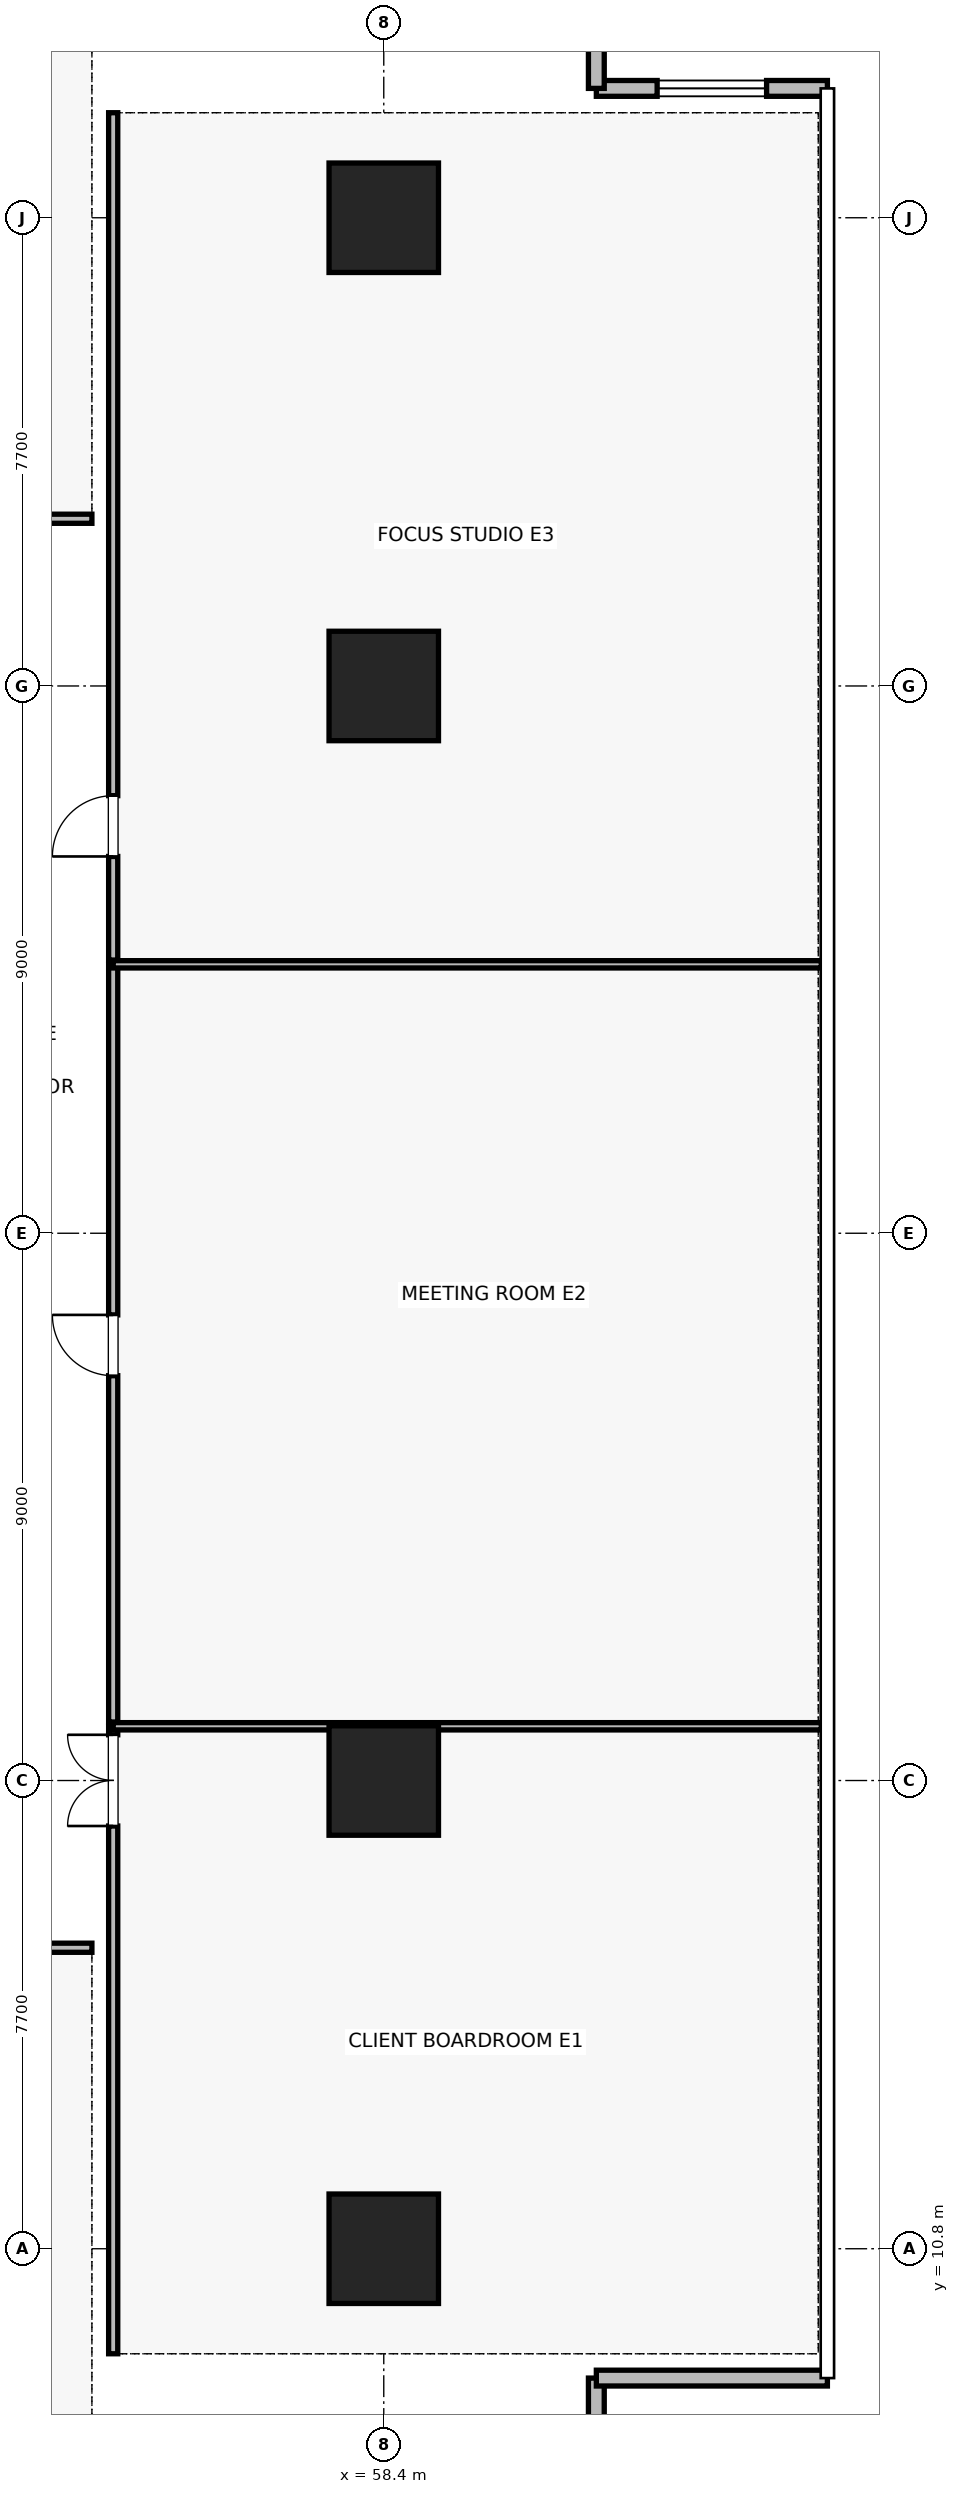
"""IFC4 building model, lengths in metres.
Left out: names, types, materials, properties, quantities, classifications, styles, units other than length and angle.
Written with IfcOpenShell. Run it as: python <this file> out.ifc"""

import sys

from ifc_helpers import new_model, si_unit, direction, frame, frame_2d, origin, origin_2d, place, context, subcontext, project, spatial, rectangle, extrude, element, fill, save


model = new_model("IFC4")
c1 = context("Model", 3, precision=1e-05, world=origin(), true_north=direction((0.0, 1.0)))
c2 = subcontext(c1, "Body", "Model", "MODEL_VIEW")
j1 = project(units=[si_unit("LENGTHUNIT", "METRE"), si_unit("PLANEANGLEUNIT", "RADIAN")], contexts=[c1])
p1 = place(None, origin())
s1 = spatial("IfcSite", under=j1, at=p1, CompositionType="ELEMENT")
p2 = place(p1, origin())
s2 = spatial("IfcBuilding", under=s1, at=p2, CompositionType="ELEMENT")
p3 = place(p2, frame((0.0, 0.0, 55.6)))
s3 = spatial("IfcBuildingStorey", under=s2, at=p3, CompositionType="ELEMENT", Elevation=55.6)
for number, where, z_axis, x_axis in (
    (1, (58.4, 18.5, 0.0), (0.0, 0.0, 1.0), (1.0, 0.0, 0.0)),
    (2, (58.4, 36.5, 0.0), (0.0, 0.0, 1.0), (1.0, 0.0, 0.0)),
    (3, (58.4, 10.8, 0.0), (0.0, 0.0, 1.0), (1.0, 0.0, 0.0)),
    (4, (58.4, 44.2, 0.0), (0.0, 0.0, 1.0), (1.0, 0.0, 0.0)),
):
    element("IfcColumn", number, at=place(p3, frame(where, z_axis=z_axis, x_axis=x_axis)), inside=s3, PredefinedType="COLUMN", context=c2, shape_type="SweptSolid", body=[
        extrude(rectangle(XDim=1.8, YDim=1.8, at=origin_2d()), origin(), (0.0, 0.0, 1.0), 4.0),
    ])
p4 = place(p3, frame((61.896, 5.273, 0.0), z_axis=(0.0, 0.0, 1.0), x_axis=(0.0, 1.0, 0.0)))
e5 = element("IfcWall", 5, at=p4, inside=s3, PredefinedType="PARAPET", context=c2, shape_type="SweptSolid", body=[
    extrude(rectangle(XDim=3.4, YDim=0.26, at=frame_2d((1.7, 0.0))), origin(), (0.0, 0.0, 1.0), 3.76),
])
p5 = place(p4, frame((0.8, 0.0, 0.85)))
e6 = element("IfcOpeningElement", 6, at=p5, cuts=e5, PredefinedType="OPENING", context=c2, shape_type="SweptSolid", body=[
    extrude(rectangle(XDim=1.8, YDim=2.2, at=frame_2d((0.9, 1.1))), frame((0.0, 0.13, 0.0), z_axis=(0.0, -1.0, 0.0), x_axis=(1.0, 0.0, 0.0)), (0.0, 0.0, 1.0), 0.26),
])
p6 = place(p3, frame((61.896, 8.673, 0.0), z_axis=(0.0, 0.0, 1.0), x_axis=(1.0, 0.0, 0.0)))
e7 = element("IfcWall", 7, at=p6, inside=s3, PredefinedType="PARAPET", context=c2, shape_type="SweptSolid", body=[
    extrude(rectangle(XDim=3.8, YDim=0.26, at=frame_2d((1.9, 0.0))), origin(), (0.0, 0.0, 1.0), 3.76),
])
p7 = place(p3, frame((65.696, 46.327, 0.0), z_axis=(0.0, 0.0, 1.0), x_axis=(-1.0, 0.0, 0.0)))
e8 = element("IfcWall", 8, at=p7, inside=s3, PredefinedType="PARAPET", context=c2, shape_type="SweptSolid", body=[
    extrude(rectangle(XDim=3.8, YDim=0.26, at=frame_2d((1.9, 0.0))), origin(), (0.0, 0.0, 1.0), 3.76),
])
p8 = place(p7, frame((1.0, 0.0, 0.85)))
e9 = element("IfcOpeningElement", 9, at=p8, cuts=e8, PredefinedType="OPENING", context=c2, shape_type="SweptSolid", body=[
    extrude(rectangle(XDim=1.8, YDim=2.2, at=frame_2d((0.9, 1.1))), frame((0.0, 0.13, 0.0), z_axis=(0.0, -1.0, 0.0), x_axis=(1.0, 0.0, 0.0)), (0.0, 0.0, 1.0), 0.26),
])
p9 = place(p3, frame((61.896, 46.327, 0.0), z_axis=(0.0, 0.0, 1.0), x_axis=(0.0, 1.0, 0.0)))
e10 = element("IfcWall", 10, at=p9, inside=s3, PredefinedType="PARAPET", context=c2, shape_type="SweptSolid", body=[
    extrude(rectangle(XDim=3.4, YDim=0.26, at=frame_2d((1.7, 0.0))), origin(), (0.0, 0.0, 1.0), 3.76),
])
p10 = place(p3, frame((46.87, 39.25, 0.0), z_axis=(0.0, 0.0, 1.0), x_axis=(1.0, 0.0, 0.0)))
e11 = element("IfcWall", 11, at=p10, inside=s3, PredefinedType="PARTITIONING", context=c2, shape_type="SweptSolid", body=[
    extrude(rectangle(XDim=6.73, YDim=0.15, at=frame_2d((3.365, 0.0))), origin(), (0.0, 0.0, 1.0), 2.85),
])
p11 = place(p10, frame((2.815, 0.0, 0.0)))
e12 = element("IfcOpeningElement", 12, at=p11, cuts=e11, PredefinedType="OPENING", context=c2, shape_type="SweptSolid", body=[
    extrude(rectangle(XDim=1.0, YDim=2.15, at=frame_2d((0.5, 1.075))), frame((0.0, 0.075, 0.0), z_axis=(0.0, -1.0, 0.0), x_axis=(1.0, 0.0, 0.0)), (0.0, 0.0, 1.0), 0.15),
])
p12 = place(p3, frame((37.894, 15.75, 0.0), z_axis=(0.0, 0.0, 1.0), x_axis=(1.0, 0.0, 0.0)))
e13 = element("IfcWall", 13, at=p12, inside=s3, PredefinedType="PARTITIONING", context=c2, shape_type="SweptSolid", body=[
    extrude(rectangle(XDim=15.706, YDim=0.15, at=frame_2d((7.853, 0.0))), origin(), (0.0, 0.0, 1.0), 2.85),
])
p13 = place(p12, frame((7.303, 0.0, 0.0)))
e14 = element("IfcOpeningElement", 14, at=p13, cuts=e13, PredefinedType="OPENING", context=c2, shape_type="SweptSolid", body=[
    extrude(rectangle(XDim=1.0, YDim=2.15, at=frame_2d((0.5, 1.075))), frame((0.0, 0.075, 0.0), z_axis=(0.0, -1.0, 0.0), x_axis=(1.0, 0.0, 0.0)), (0.0, 0.0, 1.0), 0.15),
])
p14 = place(p3, frame((53.95, 9.073, 0.0), z_axis=(0.0, 0.0, 1.0), x_axis=(0.0, 1.0, 0.0)))
e15 = element("IfcWall", 15, at=p14, inside=s3, PredefinedType="PARTITIONING", context=c2, shape_type="SweptSolid", body=[
    extrude(rectangle(XDim=10.319, YDim=0.15, at=frame_2d((5.16, 0.0))), origin(), (0.0, 0.0, 1.0), 2.85),
])
p15 = place(p14, frame((8.679, 0.0, 0.0)))
e16 = element("IfcOpeningElement", 16, at=p15, cuts=e15, PredefinedType="OPENING", context=c2, shape_type="SweptSolid", body=[
    extrude(rectangle(XDim=1.5, YDim=2.25, at=frame_2d((0.75, 1.125))), frame((0.0, 0.075, 0.0), z_axis=(0.0, -1.0, 0.0), x_axis=(1.0, 0.0, 0.0)), (0.0, 0.0, 1.0), 0.15),
])
p16 = place(p3, frame((53.95, 19.392, 0.0), z_axis=(0.0, 0.0, 1.0), x_axis=(1.0, 0.0, 0.0)))
e17 = element("IfcWall", 17, at=p16, inside=s3, PredefinedType="PARTITIONING", context=c2, shape_type="SweptSolid", body=[
    extrude(rectangle(XDim=11.646, YDim=0.12, at=frame_2d((5.823, 0.0))), origin(), (0.0, 0.0, 1.0), 2.85),
])
p17 = place(p3, frame((53.95, 19.462, 0.0), z_axis=(0.0, 0.0, 1.0), x_axis=(0.0, 1.0, 0.0)))
e18 = element("IfcWall", 18, at=p17, inside=s3, PredefinedType="PARTITIONING", context=c2, shape_type="SweptSolid", body=[
    extrude(rectangle(XDim=12.461, YDim=0.15, at=frame_2d((6.23, 0.0))), origin(), (0.0, 0.0, 1.0), 2.85),
])
p18 = place(p17, frame((5.695, 0.0, 0.0)))
e19 = element("IfcOpeningElement", 19, at=p18, cuts=e18, PredefinedType="OPENING", context=c2, shape_type="SweptSolid", body=[
    extrude(rectangle(XDim=1.0, YDim=2.15, at=frame_2d((0.5, 1.075))), frame((0.0, 0.075, 0.0), z_axis=(0.0, -1.0, 0.0), x_axis=(1.0, 0.0, 0.0)), (0.0, 0.0, 1.0), 0.15),
])
p19 = place(p3, frame((53.95, 31.923, 0.0), z_axis=(0.0, 0.0, 1.0), x_axis=(1.0, 0.0, 0.0)))
e20 = element("IfcWall", 20, at=p19, inside=s3, PredefinedType="PARTITIONING", context=c2, shape_type="SweptSolid", body=[
    extrude(rectangle(XDim=11.646, YDim=0.12, at=frame_2d((5.823, 0.0))), origin(), (0.0, 0.0, 1.0), 2.85),
])
p20 = place(p3, frame((53.95, 31.992, 0.0), z_axis=(0.0, 0.0, 1.0), x_axis=(0.0, 1.0, 0.0)))
e21 = element("IfcWall", 21, at=p20, inside=s3, PredefinedType="PARTITIONING", context=c2, shape_type="SweptSolid", body=[
    extrude(rectangle(XDim=13.935, YDim=0.15, at=frame_2d((6.967, 0.0))), origin(), (0.0, 0.0, 1.0), 2.85),
])
p21 = place(p20, frame((1.704, 0.0, 0.0)))
e22 = element("IfcOpeningElement", 22, at=p21, cuts=e21, PredefinedType="OPENING", context=c2, shape_type="SweptSolid", body=[
    extrude(rectangle(XDim=1.0, YDim=2.15, at=frame_2d((0.5, 1.075))), frame((0.0, 0.075, 0.0), z_axis=(0.0, -1.0, 0.0), x_axis=(1.0, 0.0, 0.0)), (0.0, 0.0, 1.0), 0.15),
])
p22 = place(p8, origin())
e23 = element("IfcWindow", 23, at=p22, inside=s3, PartitioningType="SINGLE_PANEL", PredefinedType="WINDOW", context=c2, shape_type="SweptSolid", body=[
    extrude(rectangle(XDim=1.8, YDim=2.2, at=frame_2d((0.9, 1.1))), frame((0.0, 0.03, 0.0), z_axis=(0.0, -1.0, 0.0), x_axis=(1.0, 0.0, 0.0)), (0.0, 0.0, 1.0), 0.06),
])
fill(e9, e23)
p23 = place(p15, origin())
e24 = element("IfcDoor", 24, at=p23, inside=s3, OperationType="DOUBLE_DOOR_SINGLE_SWING", PredefinedType="DOOR", context=c2, shape_type="SweptSolid", body=[
    extrude(rectangle(XDim=1.5, YDim=2.25, at=frame_2d((0.75, 1.125))), frame((0.0, 0.025, 0.0), z_axis=(0.0, -1.0, 0.0), x_axis=(1.0, 0.0, 0.0)), (0.0, 0.0, 1.0), 0.05),
])
fill(e16, e24)
p24 = place(p18, origin())
e25 = element("IfcDoor", 25, at=p24, inside=s3, OperationType="SINGLE_SWING_RIGHT", PredefinedType="DOOR", context=c2, shape_type="SweptSolid", body=[
    extrude(rectangle(XDim=1.0, YDim=2.15, at=frame_2d((0.5, 1.075))), frame((0.0, 0.025, 0.0), z_axis=(0.0, -1.0, 0.0), x_axis=(1.0, 0.0, 0.0)), (0.0, 0.0, 1.0), 0.05),
])
fill(e19, e25)
p25 = place(p21, origin())
e26 = element("IfcDoor", 26, at=p25, inside=s3, OperationType="SINGLE_SWING_LEFT", PredefinedType="DOOR", context=c2, shape_type="SweptSolid", body=[
    extrude(rectangle(XDim=1.0, YDim=2.15, at=frame_2d((0.5, 1.075))), frame((0.0, 0.025, 0.0), z_axis=(0.0, -1.0, 0.0), x_axis=(1.0, 0.0, 0.0)), (0.0, 0.0, 1.0), 0.05),
])
fill(e22, e26)
save(model, sys.argv[1])
